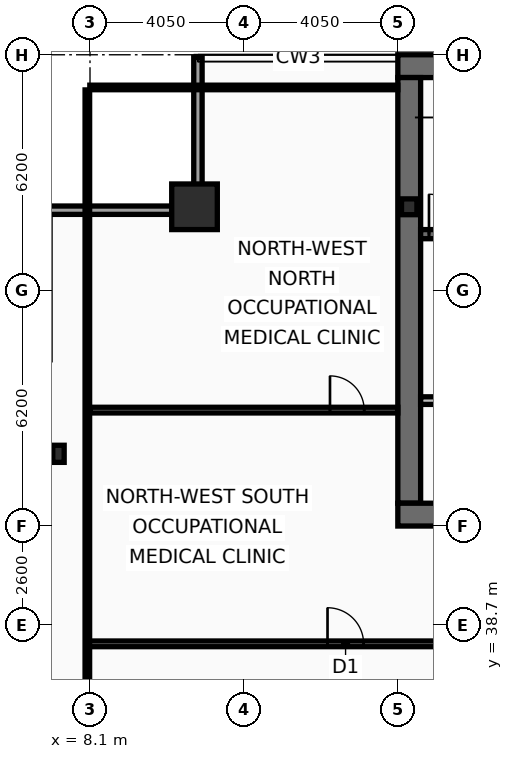
"""IFC4 building model, lengths in metres.
Left out: names, types, materials, properties, quantities, classifications, styles, units other than length and angle.
Written with IfcOpenShell. Run it as: python <this file> out.ifc"""

import sys

from ifc_helpers import new_model, si_unit, direction, frame, frame_2d, origin, origin_2d, place, context, subcontext, project, spatial, rectangle, hollow_rectangle, i_section, extrude, element, fill, save


model = new_model("IFC4")
c1 = context("Model", 3, precision=1e-05, world=origin(), true_north=direction((0.0, 1.0)))
c2 = subcontext(c1, "Body", "Model", "MODEL_VIEW")
j1 = project(units=[si_unit("LENGTHUNIT", "METRE"), si_unit("PLANEANGLEUNIT", "RADIAN")], contexts=[c1])
p1 = place(None, origin())
s1 = spatial("IfcSite", under=j1, at=p1, CompositionType="ELEMENT")
p2 = place(p1, origin())
s2 = spatial("IfcBuilding", under=s1, at=p2, CompositionType="ELEMENT")
p3 = place(p2, frame((0.0, 0.0, 199.4)))
s3 = spatial("IfcBuildingStorey", under=s2, at=p3, CompositionType="ELEMENT", Elevation=199.4)
p4 = place(p3, frame((16.2, 53.4, 0.0), z_axis=(0.0, 0.0, 1.0), x_axis=(1.0, 0.0, 0.0)))
e1 = element("IfcWall", 1, at=p4, inside=s3, PredefinedType="SHEAR", context=c2, shape_type="SweptSolid", body=[
    extrude(rectangle(XDim=40.5, YDim=0.6, at=frame_2d((20.25, 0.0))), origin(), (0.0, 0.0, 1.0), 3.44),
])
p5 = place(p3, frame((16.5, 41.9, 0.0), z_axis=(0.0, 0.0, 1.0), x_axis=(0.0, 1.0, 0.0)))
e2 = element("IfcWall", 2, at=p5, inside=s3, PredefinedType="SHEAR", context=c2, shape_type="SweptSolid", body=[
    extrude(rectangle(XDim=11.2, YDim=0.6, at=frame_2d((5.6, 0.0))), origin(), (0.0, 0.0, 1.0), 3.44),
])
p6 = place(p3, frame((18.65, 41.6, 0.0), z_axis=(0.0, 0.0, 1.0), x_axis=(-1.0, 0.0, 0.0)))
e3 = element("IfcWall", 3, at=p6, inside=s3, PredefinedType="SHEAR", context=c2, shape_type="SweptSolid", body=[
    extrude(rectangle(XDim=2.45, YDim=0.6, at=frame_2d((1.225, 0.0))), origin(), (0.0, 0.0, 1.0), 3.44),
])
p7 = place(p3, frame((16.8, 48.98, 0.0), z_axis=(0.0, 0.0, 1.0), x_axis=(1.0, 0.0, 0.0)))
e4 = element("IfcWall", 4, at=p7, inside=s3, PredefinedType="SHEAR", context=c2, shape_type="SweptSolid", body=[
    extrude(rectangle(XDim=7.42, YDim=0.24, at=frame_2d((3.71, 0.0))), origin(), (0.0, 0.0, 1.0), 3.44),
])
p8 = place(p7, frame((0.22, 0.0, 0.0)))
e5 = element("IfcOpeningElement", 5, at=p8, cuts=e4, PredefinedType="OPENING", context=c2, shape_type="SweptSolid", body=[
    extrude(rectangle(XDim=1.05, YDim=2.15, at=frame_2d((0.525, 1.075))), frame((0.0, 0.13, 0.0), z_axis=(0.0, -1.0, 0.0), x_axis=(1.0, 0.0, 0.0)), (0.0, 0.0, 1.0), 0.26),
])
p9 = place(p3, frame((10.85, 49.7, 0.0), z_axis=(0.0, 0.0, 1.0), x_axis=(1.0, 0.0, 0.0)))
e6 = element("IfcColumn", 6, at=p9, inside=s3, PredefinedType="COLUMN", context=c2, shape_type="SweptSolid", body=[
    extrude(hollow_rectangle(XDim=1.2, YDim=1.2, WallThickness=0.06, at=origin_2d()), origin(), (0.0, 0.0, 1.0), 3.6),
])
p10 = place(p3, frame((7.27, 43.2, 0.0), z_axis=(0.0, 0.0, 1.0), x_axis=(1.0, 0.0, 0.0)))
e7 = element("IfcColumn", 7, at=p10, inside=s3, PredefinedType="COLUMN", context=c2, shape_type="SweptSolid", body=[
    extrude(i_section(OverallWidth=0.3, OverallDepth=0.45, WebThickness=0.014, FlangeThickness=0.026, at=origin_2d()), origin(), (0.0, 0.0, 1.0), 3.6),
])
p11 = place(p3, frame((16.5, 49.7, 0.0), z_axis=(0.0, 0.0, 1.0), x_axis=(1.0, 0.0, 0.0)))
e8 = element("IfcColumn", 8, at=p11, inside=s3, PredefinedType="COLUMN", context=c2, shape_type="SweptSolid", body=[
    extrude(i_section(OverallWidth=0.406, OverallDepth=0.416, WebThickness=0.03, FlangeThickness=0.048, at=origin_2d()), origin(), (0.0, 0.0, 1.0), 3.6),
])
p12 = place(p3, frame((6.83, 49.61, 0.0), z_axis=(0.0, 0.0, 1.0), x_axis=(1.0, 0.0, 0.0)))
e9 = element("IfcWall", 9, at=p12, inside=s3, PredefinedType="SOLIDWALL", context=c2, shape_type="SweptSolid", body=[
    extrude(rectangle(XDim=4.22, YDim=0.22, at=frame_2d((2.11, 0.0))), origin(), (0.0, 0.0, 1.0), 2.83),
])
p13 = place(p3, frame((10.94, 49.72, 0.0), z_axis=(0.0, 0.0, 1.0), x_axis=(0.0, 1.0, 0.0)))
e10 = element("IfcWall", 10, at=p13, inside=s3, PredefinedType="SOLIDWALL", context=c2, shape_type="SweptSolid", body=[
    extrude(rectangle(XDim=3.91, YDim=0.22, at=frame_2d((1.955, 0.0))), origin(), (0.0, 0.0, 1.0), 2.83),
])
p14 = place(p3, frame((16.8, 44.6, 0.0), z_axis=(0.0, 0.0, 1.0), x_axis=(1.0, 0.0, 0.0)))
e11 = element("IfcWall", 11, at=p14, inside=s3, PredefinedType="PARTITIONING", context=c2, shape_type="SweptSolid", body=[
    extrude(rectangle(XDim=4.2, YDim=0.2, at=frame_2d((2.1, 0.0))), origin(), (0.0, 0.0, 1.0), 3.44),
])
p15 = place(p14, frame((1.25, 0.0, 0.0)))
e12 = element("IfcOpeningElement", 12, at=p15, cuts=e11, PredefinedType="OPENING", context=c2, shape_type="SweptSolid", body=[
    extrude(rectangle(XDim=1.05, YDim=2.15, at=frame_2d((0.525, 1.075))), frame((0.0, 0.11, 0.0), z_axis=(0.0, -1.0, 0.0), x_axis=(1.0, 0.0, 0.0)), (0.0, 0.0, 1.0), 0.22),
])
p16 = place(p3, frame((8.03, 38.2, 0.0), z_axis=(0.0, 0.0, 1.0), x_axis=(1.0, 0.0, 0.0)))
e13 = element("IfcWall", 13, at=p16, inside=s3, PredefinedType="PARTITIONING", context=c2, shape_type="SweptSolid", body=[
    extrude(rectangle(XDim=10.52, YDim=0.15, at=frame_2d((5.26, 0.0))), origin(), (0.0, 0.0, 1.0), 2.73),
])
p17 = place(p16, frame((6.32, 0.0, 0.0)))
e14 = element("IfcOpeningElement", 14, at=p17, cuts=e13, PredefinedType="OPENING", context=c2, shape_type="SweptSolid", body=[
    extrude(rectangle(XDim=0.95, YDim=2.05, at=frame_2d((0.475, 1.025))), frame((0.0, 0.085, 0.0), z_axis=(0.0, -1.0, 0.0), x_axis=(1.0, 0.0, 0.0)), (0.0, 0.0, 1.0), 0.17),
])
p18 = place(p3, frame((8.095, 44.35, 0.0), z_axis=(0.0, 0.0, 1.0), x_axis=(1.0, 0.0, 0.0)))
e15 = element("IfcWall", 15, at=p18, inside=s3, PredefinedType="PARTITIONING", context=c2, shape_type="SweptSolid", body=[
    extrude(rectangle(XDim=8.105, YDim=0.15, at=frame_2d((4.052, 0.0))), origin(), (0.0, 0.0, 1.0), 2.83),
])
p19 = place(p18, frame((6.32, 0.0, 0.0)))
e16 = element("IfcOpeningElement", 16, at=p19, cuts=e15, PredefinedType="OPENING", context=c2, shape_type="SweptSolid", body=[
    extrude(rectangle(XDim=0.9, YDim=2.05, at=frame_2d((0.45, 1.025))), frame((0.0, 0.085, 0.0), z_axis=(0.0, -1.0, 0.0), x_axis=(1.0, 0.0, 0.0)), (0.0, 0.0, 1.0), 0.17),
])
p20 = place(p3, frame((8.03, 10.665, 0.0), z_axis=(0.0, 0.0, 1.0), x_axis=(0.0, 1.0, 0.0)))
e17 = element("IfcWall", 17, at=p20, inside=s3, PredefinedType="PARTITIONING", context=c2, shape_type="SweptSolid", body=[
    extrude(rectangle(XDim=42.11, YDim=0.12, at=frame_2d((21.055, 0.0))), origin(), (0.0, 0.0, 1.0), 2.73),
])
p21 = place(p3, frame((8.095, 52.84, 0.0), z_axis=(0.0, 0.0, 1.0), x_axis=(1.0, 0.0, 0.0)))
e18 = element("IfcWall", 18, at=p21, inside=s3, PredefinedType="PARTITIONING", context=c2, shape_type="SweptSolid", body=[
    extrude(rectangle(XDim=8.105, YDim=0.12, at=frame_2d((4.052, 0.0))), origin(), (0.0, 0.0, 1.0), 3.44),
])
p22 = place(p8, origin())
e19 = element("IfcDoor", 19, at=p22, inside=s3, OperationType="SINGLE_SWING_LEFT", PredefinedType="DOOR", context=c2, shape_type="SweptSolid", body=[
    extrude(rectangle(XDim=1.05, YDim=2.15, at=frame_2d((0.525, 1.075))), frame((0.0, 0.025, 0.0), z_axis=(0.0, -1.0, 0.0), x_axis=(1.0, 0.0, 0.0)), (0.0, 0.0, 1.0), 0.05),
])
fill(e5, e19)
p23 = place(p17, origin())
e20 = element("IfcDoor", 20, at=p23, inside=s3, OperationType="SINGLE_SWING_LEFT", PredefinedType="DOOR", context=c2, shape_type="SweptSolid", body=[
    extrude(rectangle(XDim=0.95, YDim=2.05, at=frame_2d((0.475, 1.025))), frame((0.0, 0.025, 0.0), z_axis=(0.0, -1.0, 0.0), x_axis=(1.0, 0.0, 0.0)), (0.0, 0.0, 1.0), 0.05),
])
fill(e14, e20)
p24 = place(p19, origin())
e21 = element("IfcDoor", 21, at=p24, inside=s3, OperationType="SINGLE_SWING_LEFT", PredefinedType="DOOR", context=c2, shape_type="SweptSolid", body=[
    extrude(rectangle(XDim=0.9, YDim=2.05, at=frame_2d((0.45, 1.025))), frame((0.0, 0.025, 0.0), z_axis=(0.0, -1.0, 0.0), x_axis=(1.0, 0.0, 0.0)), (0.0, 0.0, 1.0), 0.05),
])
fill(e16, e21)
save(model, sys.argv[1])
